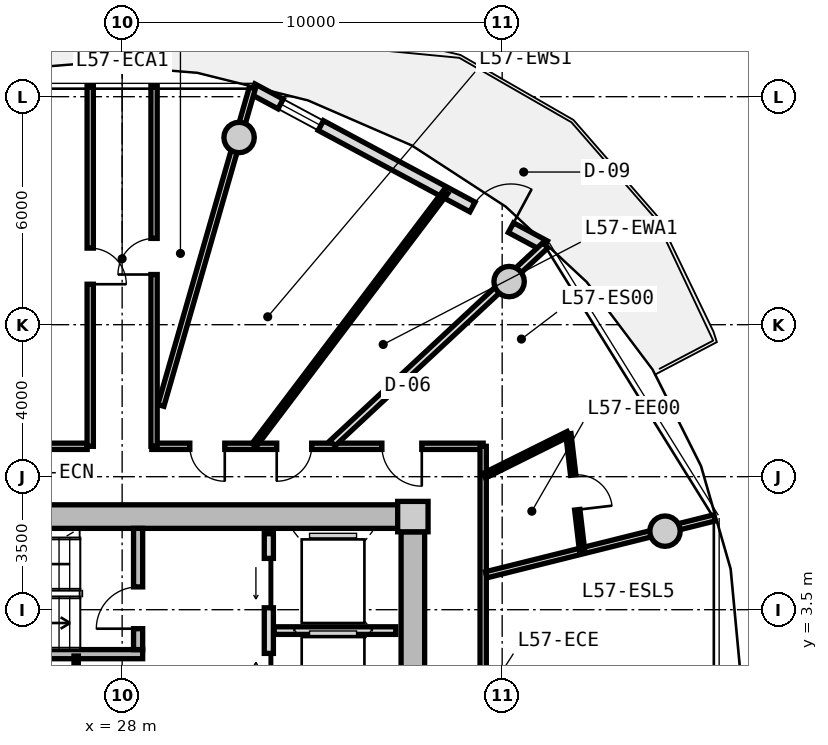
"""IFC4 building model, lengths in metres.
Left out: names, types, materials, properties, quantities, classifications, styles, units other than length and angle.
Written with IfcOpenShell. Run it as: python <this file> out.ifc"""

import sys

from ifc_helpers import new_model, si_unit, direction, frame, frame_2d, origin, origin_2d, place, context, subcontext, project, spatial, rectangle, circle, extrude, source, transform, mapped, element, fill, save


model = new_model("IFC4")
c1 = context("Model", 3, precision=1e-05, world=origin(), true_north=direction((0.0, 1.0)))
c2 = subcontext(c1, "Body", "Model", "MODEL_VIEW")
j1 = project(units=[si_unit("LENGTHUNIT", "METRE"), si_unit("PLANEANGLEUNIT", "RADIAN")], contexts=[c1])
p1 = place(None, origin())
s1 = spatial("IfcSite", under=j1, at=p1, CompositionType="ELEMENT")
p2 = place(p1, origin())
s2 = spatial("IfcBuilding", under=s1, at=p2, CompositionType="ELEMENT")
p3 = place(p2, frame((0.0, 0.0, 183.1)))
s3 = spatial("IfcBuildingStorey", under=s2, at=p3, CompositionType="ELEMENT", Elevation=183.1)
m1 = source(origin(), c2, "Body", "SweptSolid", [
    extrude(rectangle(XDim=0.8, YDim=0.8, at=origin_2d()), origin(), (0.0, 0.0, 1.0), 3.05),
])
p4 = place(p3, frame((35.65, 5.95, 0.0), z_axis=(0.0, 0.0, 1.0), x_axis=(1.0, 0.0, 0.0)))
e1 = element("IfcColumn", 1, at=p4, inside=s3, PredefinedType="COLUMN", context=c2, shape_type="MappedRepresentation", body=[
    mapped(m1, transform((0.0, 0.0, 0.0), x_axis=(1.0, 0.0, 0.0), y_axis=(0.0, 1.0, 0.0), z_axis=(0.0, 0.0, 1.0), scale=1.0)),
])
m2 = source(origin(), c2, "Body", "SweptSolid", [
    extrude(rectangle(XDim=14.5, YDim=0.62, at=frame_2d((7.25, 0.0))), origin(), (0.0, 0.0, 1.0), 2.73),
])
p5 = place(p3, frame((20.75, 5.95, 0.0), z_axis=(0.0, 0.0, 1.0), x_axis=(1.0, 0.0, 0.0)))
e2 = element("IfcWall", 2, at=p5, inside=s3, PredefinedType="SHEAR", context=c2, shape_type="MappedRepresentation", body=[
    mapped(m2, transform((0.0, 0.0, 0.0), x_axis=(1.0, 0.0, 0.0), y_axis=(0.0, 1.0, 0.0), z_axis=(0.0, 0.0, 1.0), scale=1.0)),
])
m3 = source(origin(), c2, "Body", "SweptSolid", [
    extrude(rectangle(XDim=11.1, YDim=0.62, at=frame_2d((5.55, 0.0))), origin(), (0.0, 0.0, 1.0), 2.73),
])
p6 = place(p3, frame((35.65, 5.55, 0.0), z_axis=(0.0, 0.0, 1.0), x_axis=(0.0, -1.0, 0.0)))
e3 = element("IfcWall", 3, at=p6, inside=s3, PredefinedType="SHEAR", context=c2, shape_type="MappedRepresentation", body=[
    mapped(m3, transform((0.0, 0.0, 0.0), x_axis=(1.0, 0.0, 0.0), y_axis=(0.0, 1.0, 0.0), z_axis=(0.0, 0.0, 1.0), scale=1.0)),
])
p7 = place(p6, frame((5.65, 0.0, 0.0)))
e4 = element("IfcOpeningElement", 4, at=p7, cuts=e3, PredefinedType="OPENING", context=c2, shape_type="SweptSolid", body=[
    extrude(rectangle(XDim=1.2, YDim=2.15, at=frame_2d((0.6, 1.075))), frame((0.0, 0.32, 0.0), z_axis=(0.0, -1.0, 0.0), x_axis=(1.0, 0.0, 0.0)), (0.0, 0.0, 1.0), 0.64),
])
m4 = source(origin(), c2, "Body", "SweptSolid", [
    extrude(circle(Radius=0.4, at=origin_2d()), origin(), (0.0, 0.0, 1.0), 3.05),
])
for number, where, z_axis, x_axis in (
    (5, (42.285, 5.567, 0.0), (0.0, 0.0, 1.0), (1.0, 0.0, 0.0)),
    (6, (38.183, 12.135, 0.0), (0.0, 0.0, 1.0), (1.0, 0.0, 0.0)),
    (7, (31.077, 15.926, 0.0), (0.0, 0.0, 1.0), (1.0, 0.0, 0.0)),
):
    element("IfcColumn", number, at=place(p3, frame(where, z_axis=z_axis, x_axis=x_axis)), inside=s3, PredefinedType="COLUMN", context=c2, shape_type="MappedRepresentation", body=[
        mapped(m4, transform((0.0, 0.0, 0.0), x_axis=(1.0, 0.0, 0.0), y_axis=(0.0, 1.0, 0.0), z_axis=(0.0, 0.0, 1.0), scale=1.0)),
    ])
m5 = source(origin(), c2, "Body", "SweptSolid", [
    extrude(rectangle(XDim=8.742, YDim=0.29, at=frame_2d((4.371, 0.0))), origin(), (0.0, 0.0, 1.0), 2.73),
])
p8 = place(p3, frame((31.422, 17.211, 0.0), z_axis=(0.0, 0.0, 1.0), x_axis=(0.880992489116, -0.473130250693, 0.0)))
e8 = element("IfcWall", 8, at=p8, inside=s3, PredefinedType="SOLIDWALL", context=c2, shape_type="MappedRepresentation", body=[
    mapped(m5, transform((0.0, 0.0, 0.0), x_axis=(1.0, 0.0, 0.0), y_axis=(0.0, 1.0, 0.0), z_axis=(0.0, 0.0, 1.0), scale=1.0)),
])
p9 = place(p8, frame((6.58, 0.0, 0.0)))
e9 = element("IfcOpeningElement", 9, at=p9, cuts=e8, PredefinedType="OPENING", context=c2, shape_type="SweptSolid", body=[
    extrude(rectangle(XDim=1.15, YDim=2.25, at=frame_2d((0.575, 1.125))), frame((0.0, 0.155, 0.0), z_axis=(0.0, -1.0, 0.0), x_axis=(1.0, 0.0, 0.0)), (0.0, 0.0, 1.0), 0.31),
])
p10 = place(p8, frame((0.85, 0.0, 0.85)))
e10 = element("IfcOpeningElement", 10, at=p10, cuts=e8, PredefinedType="OPENING", context=c2, shape_type="SweptSolid", body=[
    extrude(rectangle(XDim=1.2, YDim=1.5, at=frame_2d((0.6, 0.75))), frame((0.0, 0.155, 0.0), z_axis=(0.0, -1.0, 0.0), x_axis=(1.0, 0.0, 0.0)), (0.0, 0.0, 1.0), 0.31),
])
m6 = source(origin(), c2, "Body", "SweptSolid", [
    extrude(rectangle(XDim=7.88, YDim=0.24, at=frame_2d((3.94, 0.0))), origin(), (0.0, 0.0, 1.0), 2.73),
])
p11 = place(p3, frame((20.66, 2.33, 0.0), z_axis=(0.0, 0.0, 1.0), x_axis=(1.0, 0.0, 0.0)))
e11 = element("IfcWall", 11, at=p11, inside=s3, PredefinedType="PARTITIONING", context=c2, shape_type="MappedRepresentation", body=[
    mapped(m6, transform((0.0, 0.0, 0.0), x_axis=(1.0, 0.0, 0.0), y_axis=(0.0, 1.0, 0.0), z_axis=(0.0, 0.0, 1.0), scale=1.0)),
])
m7 = source(origin(), c2, "Body", "SweptSolid", [
    extrude(rectangle(XDim=3.19, YDim=0.24, at=frame_2d((1.595, 0.0))), origin(), (0.0, 0.0, 1.0), 2.73),
])
p12 = place(p3, frame((28.42, 2.45, 0.0), z_axis=(0.0, 0.0, 1.0), x_axis=(0.0, 1.0, 0.0)))
e12 = element("IfcWall", 12, at=p12, inside=s3, PredefinedType="PARTITIONING", context=c2, shape_type="MappedRepresentation", body=[
    mapped(m7, transform((0.0, 0.0, 0.0), x_axis=(1.0, 0.0, 0.0), y_axis=(0.0, 1.0, 0.0), z_axis=(0.0, 0.0, 1.0), scale=1.0)),
])
p13 = place(p12, frame((0.55, 0.0, 0.0)))
e13 = element("IfcOpeningElement", 13, at=p13, cuts=e12, PredefinedType="OPENING", context=c2, shape_type="SweptSolid", body=[
    extrude(rectangle(XDim=1.1, YDim=2.15, at=frame_2d((0.55, 1.075))), frame((0.0, 0.13, 0.0), z_axis=(0.0, -1.0, 0.0), x_axis=(1.0, 0.0, 0.0)), (0.0, 0.0, 1.0), 0.26),
])
m8 = source(origin(), c2, "Body", "SweptSolid", [
    extrude(rectangle(XDim=5.0, YDim=0.24, at=frame_2d((2.5, 0.0))), origin(), (0.0, 0.0, 1.0), 2.715),
])
p14 = place(p3, frame((31.86, 0.5, 0.0), z_axis=(0.0, 0.0, 1.0), x_axis=(0.0, 1.0, 0.0)))
e14 = element("IfcWall", 14, at=p14, inside=s3, PredefinedType="PARTITIONING", context=c2, shape_type="MappedRepresentation", body=[
    mapped(m8, transform((0.0, 0.0, 0.0), x_axis=(1.0, 0.0, 0.0), y_axis=(0.0, 1.0, 0.0), z_axis=(0.0, 0.0, 1.0), scale=1.0)),
])
p15 = place(p14, frame((3.05, 0.0, 0.0)))
e15 = element("IfcOpeningElement", 15, at=p15, cuts=e14, PredefinedType="OPENING", context=c2, shape_type="SweptSolid", body=[
    extrude(rectangle(XDim=1.3, YDim=2.2, at=frame_2d((0.65, 1.1))), frame((0.0, 0.13, 0.0), z_axis=(0.0, -1.0, 0.0), x_axis=(1.0, 0.0, 0.0)), (0.0, 0.0, 1.0), 0.26),
])
p16 = place(p14, frame((0.55, 0.0, 0.0)))
e16 = element("IfcOpeningElement", 16, at=p16, cuts=e14, PredefinedType="OPENING", context=c2, shape_type="SweptSolid", body=[
    extrude(rectangle(XDim=1.3, YDim=2.2, at=frame_2d((0.65, 1.1))), frame((0.0, 0.13, 0.0), z_axis=(0.0, -1.0, 0.0), x_axis=(1.0, 0.0, 0.0)), (0.0, 0.0, 1.0), 0.26),
])
m9 = source(origin(), c2, "Body", "SweptSolid", [
    extrude(rectangle(XDim=3.2, YDim=0.2, at=frame_2d((1.6, 0.0))), origin(), (0.0, 0.0, 1.0), 2.715),
])
p17 = place(p3, frame((32.0, 2.95, 0.0), z_axis=(0.0, 0.0, 1.0), x_axis=(1.0, 0.0, 0.0)))
e17 = element("IfcWall", 17, at=p17, inside=s3, PredefinedType="PARTITIONING", context=c2, shape_type="MappedRepresentation", body=[
    mapped(m9, transform((0.0, 0.0, 0.0), x_axis=(1.0, 0.0, 0.0), y_axis=(0.0, 1.0, 0.0), z_axis=(0.0, 0.0, 1.0), scale=1.0)),
])
m10 = source(origin(), c2, "Body", "SweptSolid", [
    extrude(rectangle(XDim=2.33, YDim=0.115, at=frame_2d((1.165, 0.0))), origin(), (0.0, 0.0, 1.0), 2.715),
])
p18 = place(p3, frame((26.79, -0.05, 0.0), z_axis=(0.0, 0.0, 1.0), x_axis=(0.0, 1.0, 0.0)))
e18 = element("IfcWall", 18, at=p18, inside=s3, PredefinedType="PARTITIONING", context=c2, shape_type="MappedRepresentation", body=[
    mapped(m10, transform((0.0, 0.0, 0.0), x_axis=(1.0, 0.0, 0.0), y_axis=(0.0, 1.0, 0.0), z_axis=(0.0, 0.0, 1.0), scale=1.0)),
])
m11 = source(origin(), c2, "Body", "SweptSolid", [
    extrude(rectangle(XDim=8.58, YDim=0.165, at=frame_2d((4.29, 0.0))), origin(), (0.0, 0.0, 1.0), 2.715),
])
p19 = place(p3, frame((18.5, 7.8, 0.0), z_axis=(0.0, 0.0, 1.0), x_axis=(1.0, 0.0, 0.0)))
e19 = element("IfcWall", 19, at=p19, inside=s3, PredefinedType="PARTITIONING", context=c2, shape_type="MappedRepresentation", body=[
    mapped(m11, transform((0.0, 0.0, 0.0), x_axis=(1.0, 0.0, 0.0), y_axis=(0.0, 1.0, 0.0), z_axis=(0.0, 0.0, 1.0), scale=1.0)),
])
p20 = place(p19, frame((2.843, 0.0, 0.0)))
e20 = element("IfcOpeningElement", 20, at=p20, cuts=e19, PredefinedType="OPENING", context=c2, shape_type="SweptSolid", body=[
    extrude(rectangle(XDim=1.25, YDim=2.2, at=frame_2d((0.625, 1.1))), frame((0.0, 0.093, 0.0), z_axis=(0.0, -1.0, 0.0), x_axis=(1.0, 0.0, 0.0)), (0.0, 0.0, 1.0), 0.185),
])
m12 = source(origin(), c2, "Body", "SweptSolid", [
    extrude(rectangle(XDim=8.719, YDim=0.165, at=frame_2d((4.36, 0.0))), origin(), (0.0, 0.0, 1.0), 2.715),
])
p21 = place(p3, frame((28.781, 7.8, 0.0), z_axis=(0.0, 0.0, 1.0), x_axis=(1.0, 0.0, 0.0)))
e21 = element("IfcWall", 21, at=p21, inside=s3, PredefinedType="PARTITIONING", context=c2, shape_type="MappedRepresentation", body=[
    mapped(m12, transform((0.0, 0.0, 0.0), x_axis=(1.0, 0.0, 0.0), y_axis=(0.0, 1.0, 0.0), z_axis=(0.0, 0.0, 1.0), scale=1.0)),
])
p22 = place(p21, frame((6.054, 0.0, 0.0)))
e22 = element("IfcOpeningElement", 22, at=p22, cuts=e21, PredefinedType="OPENING", context=c2, shape_type="SweptSolid", body=[
    extrude(rectangle(XDim=1.05, YDim=2.15, at=frame_2d((0.525, 1.075))), frame((0.0, 0.093, 0.0), z_axis=(0.0, -1.0, 0.0), x_axis=(1.0, 0.0, 0.0)), (0.0, 0.0, 1.0), 0.185),
])
p23 = place(p21, frame((3.287, 0.0, 0.0)))
e23 = element("IfcOpeningElement", 23, at=p23, cuts=e21, PredefinedType="OPENING", context=c2, shape_type="SweptSolid", body=[
    extrude(rectangle(XDim=0.92, YDim=2.1, at=frame_2d((0.46, 1.05))), frame((0.0, 0.093, 0.0), z_axis=(0.0, -1.0, 0.0), x_axis=(1.0, 0.0, 0.0)), (0.0, 0.0, 1.0), 0.185),
])
p24 = place(p21, frame((1.0, 0.0, 0.0)))
e24 = element("IfcOpeningElement", 24, at=p24, cuts=e21, PredefinedType="OPENING", context=c2, shape_type="SweptSolid", body=[
    extrude(rectangle(XDim=0.92, YDim=2.1, at=frame_2d((0.46, 1.05))), frame((0.0, 0.093, 0.0), z_axis=(0.0, -1.0, 0.0), x_axis=(1.0, 0.0, 0.0)), (0.0, 0.0, 1.0), 0.185),
])
m13 = source(origin(), c2, "Body", "SweptSolid", [
    extrude(rectangle(XDim=6.88, YDim=0.165, at=frame_2d((3.44, 0.0))), origin(), (0.0, 0.0, 1.0), 2.715),
])
p25 = place(p3, frame((37.5, 7.8, 0.0), z_axis=(0.0, 0.0, 1.0), x_axis=(0.0, -1.0, 0.0)))
e25 = element("IfcWall", 25, at=p25, inside=s3, PredefinedType="PARTITIONING", context=c2, shape_type="MappedRepresentation", body=[
    mapped(m13, transform((0.0, 0.0, 0.0), x_axis=(1.0, 0.0, 0.0), y_axis=(0.0, 1.0, 0.0), z_axis=(0.0, 0.0, 1.0), scale=1.0)),
])
m14 = source(origin(), c2, "Body", "SweptSolid", [
    extrude(rectangle(XDim=8.695, YDim=0.165, at=frame_2d((4.348, 0.0))), origin(), (0.0, 0.0, 1.0), 2.265),
])
p26 = place(p3, frame((29.02, 8.875, 0.0), z_axis=(0.0, 0.0, 1.0), x_axis=(0.276797231892, 0.960928349263, 0.0)))
e26 = element("IfcWall", 26, at=p26, inside=s3, PredefinedType="PARTITIONING", context=c2, shape_type="MappedRepresentation", body=[
    mapped(m14, transform((0.0, 0.0, 0.0), x_axis=(1.0, 0.0, 0.0), y_axis=(0.0, 1.0, 0.0), z_axis=(0.0, 0.0, 1.0), scale=1.0)),
])
m15 = source(origin(), c2, "Body", "SweptSolid", [
    extrude(rectangle(XDim=6.193, YDim=0.165, at=frame_2d((3.096, 0.0))), origin(), (0.0, 0.0, 1.0), 2.265),
])
p27 = place(p3, frame((37.58, 4.419, 0.0), z_axis=(0.0, 0.0, 1.0), x_axis=(0.970309243466, 0.241867674657, 0.0)))
e27 = element("IfcWall", 27, at=p27, inside=s3, PredefinedType="PARTITIONING", context=c2, shape_type="MappedRepresentation", body=[
    mapped(m15, transform((0.0, 0.0, 0.0), x_axis=(1.0, 0.0, 0.0), y_axis=(0.0, 1.0, 0.0), z_axis=(0.0, 0.0, 1.0), scale=1.0)),
])
m16 = source(origin(), c2, "Body", "SweptSolid", [
    extrude(rectangle(XDim=9.48, YDim=0.165, at=frame_2d((4.74, 0.0))), origin(), (0.0, 0.0, 1.0), 2.715),
])
p28 = place(p3, frame((27.16, 7.8, 0.0), z_axis=(0.0, 0.0, 1.0), x_axis=(0.0, 1.0, 0.0)))
e28 = element("IfcWall", 28, at=p28, inside=s3, PredefinedType="PARTITIONING", context=c2, shape_type="MappedRepresentation", body=[
    mapped(m16, transform((0.0, 0.0, 0.0), x_axis=(1.0, 0.0, 0.0), y_axis=(0.0, 1.0, 0.0), z_axis=(0.0, 0.0, 1.0), scale=1.0)),
])
p29 = place(p28, frame((4.265, 0.0, 0.0)))
e29 = element("IfcOpeningElement", 29, at=p29, cuts=e28, PredefinedType="OPENING", context=c2, shape_type="SweptSolid", body=[
    extrude(rectangle(XDim=0.95, YDim=2.1, at=frame_2d((0.475, 1.05))), frame((0.0, 0.093, 0.0), z_axis=(0.0, -1.0, 0.0), x_axis=(1.0, 0.0, 0.0)), (0.0, 0.0, 1.0), 0.185),
])
p30 = place(p3, frame((28.84, 17.28, 0.0), z_axis=(0.0, 0.0, 1.0), x_axis=(0.0, -1.0, 0.0)))
e30 = element("IfcWall", 30, at=p30, inside=s3, PredefinedType="PARTITIONING", context=c2, shape_type="MappedRepresentation", body=[
    mapped(m16, transform((0.0, 0.0, 0.0), x_axis=(1.0, 0.0, 0.0), y_axis=(0.0, 1.0, 0.0), z_axis=(0.0, 0.0, 1.0), scale=1.0)),
])
p31 = place(p30, frame((4.01, 0.0, 0.0)))
e31 = element("IfcOpeningElement", 31, at=p31, cuts=e30, PredefinedType="OPENING", context=c2, shape_type="SweptSolid", body=[
    extrude(rectangle(XDim=0.95, YDim=2.1, at=frame_2d((0.475, 1.05))), frame((0.0, 0.093, 0.0), z_axis=(0.0, -1.0, 0.0), x_axis=(1.0, 0.0, 0.0)), (0.0, 0.0, 1.0), 0.185),
])
m17 = source(origin(), c2, "Body", "SweptSolid", [
    extrude(rectangle(XDim=7.648, YDim=0.19, at=frame_2d((3.824, 0.0))), origin(), (0.0, 0.0, 1.0), 2.265),
])
p32 = place(p3, frame((33.538, 7.88, 0.0), z_axis=(0.0, 0.0, 1.0), x_axis=(0.732167856666, 0.681124239522, 0.0)))
e32 = element("IfcWall", 32, at=p32, inside=s3, PredefinedType="PARTITIONING", context=c2, shape_type="MappedRepresentation", body=[
    mapped(m17, transform((0.0, 0.0, 0.0), x_axis=(1.0, 0.0, 0.0), y_axis=(0.0, 1.0, 0.0), z_axis=(0.0, 0.0, 1.0), scale=1.0)),
])
m18 = source(origin(), c2, "Body", "SweptSolid", [
    extrude(rectangle(XDim=2.471, YDim=0.14, at=frame_2d((1.235, 0.0))), origin(), (0.0, 0.0, 1.0), 2.715),
])
p33 = place(p3, frame((37.53, 7.026, 0.0), z_axis=(0.0, 0.0, 1.0), x_axis=(0.895295102372, 0.445473545419, 0.0)))
e33 = element("IfcWall", 33, at=p33, inside=s3, PredefinedType="PARTITIONING", context=c2, shape_type="MappedRepresentation", body=[
    mapped(m18, transform((0.0, 0.0, 0.0), x_axis=(1.0, 0.0, 0.0), y_axis=(0.0, 1.0, 0.0), z_axis=(0.0, 0.0, 1.0), scale=1.0)),
])
m19 = source(origin(), c2, "Body", "SweptSolid", [
    extrude(rectangle(XDim=3.101, YDim=0.14, at=frame_2d((1.551, 0.0))), origin(), (0.0, 0.0, 1.0), 2.715),
])
p34 = place(p3, frame((39.742, 8.127, 0.0), z_axis=(0.0, 0.0, 1.0), x_axis=(0.116754457614, -0.993160811061, 0.0)))
e34 = element("IfcWall", 34, at=p34, inside=s3, PredefinedType="PARTITIONING", context=c2, shape_type="MappedRepresentation", body=[
    mapped(m19, transform((0.0, 0.0, 0.0), x_axis=(1.0, 0.0, 0.0), y_axis=(0.0, 1.0, 0.0), z_axis=(0.0, 0.0, 1.0), scale=1.0)),
])
p35 = place(p34, frame((1.09, 0.0, 0.0)))
e35 = element("IfcOpeningElement", 35, at=p35, cuts=e34, PredefinedType="OPENING", context=c2, shape_type="SweptSolid", body=[
    extrude(rectangle(XDim=0.92, YDim=2.1, at=frame_2d((0.46, 1.05))), frame((0.0, 0.08, 0.0), z_axis=(0.0, -1.0, 0.0), x_axis=(1.0, 0.0, 0.0)), (0.0, 0.0, 1.0), 0.16),
])
m20 = source(origin(), c2, "Body", "SweptSolid", [
    extrude(rectangle(XDim=8.359, YDim=0.14, at=frame_2d((4.18, 0.0))), origin(), (0.0, 0.0, 1.0), 2.715),
])
p36 = place(p3, frame((31.473, 7.83, 0.0), z_axis=(0.0, 0.0, 1.0), x_axis=(0.603265985309, 0.797540062297, 0.0)))
e36 = element("IfcWall", 36, at=p36, inside=s3, PredefinedType="PARTITIONING", context=c2, shape_type="MappedRepresentation", body=[
    mapped(m20, transform((0.0, 0.0, 0.0), x_axis=(1.0, 0.0, 0.0), y_axis=(0.0, 1.0, 0.0), z_axis=(0.0, 0.0, 1.0), scale=1.0)),
])
m21 = source(origin(), c2, "Body", "SweptSolid", [
    extrude(rectangle(XDim=1.15, YDim=2.25, at=frame_2d((0.575, 1.125))), frame((0.0, 0.025, 0.0), z_axis=(0.0, -1.0, 0.0), x_axis=(1.0, 0.0, 0.0)), (0.0, 0.0, 1.0), 0.05),
])
p37 = place(p9, origin())
e37 = element("IfcDoor", 37, at=p37, inside=s3, OperationType="SINGLE_SWING_RIGHT", PredefinedType="DOOR", context=c2, shape_type="MappedRepresentation", body=[
    mapped(m21, transform((0.0, 0.0, 0.0), x_axis=(1.0, 0.0, 0.0), y_axis=(0.0, 1.0, 0.0), z_axis=(0.0, 0.0, 1.0), scale=1.0)),
])
fill(e9, e37)
m22 = source(origin(), c2, "Body", "SweptSolid", [
    extrude(rectangle(XDim=1.2, YDim=1.5, at=frame_2d((0.6, 0.75))), frame((0.0, 0.03, 0.0), z_axis=(0.0, -1.0, 0.0), x_axis=(1.0, 0.0, 0.0)), (0.0, 0.0, 1.0), 0.06),
])
p38 = place(p10, origin())
e38 = element("IfcWindow", 38, at=p38, inside=s3, PartitioningType="SINGLE_PANEL", PredefinedType="WINDOW", context=c2, shape_type="MappedRepresentation", body=[
    mapped(m22, transform((0.0, 0.0, 0.0), x_axis=(1.0, 0.0, 0.0), y_axis=(0.0, 1.0, 0.0), z_axis=(0.0, 0.0, 1.0), scale=1.0)),
])
fill(e10, e38)
m23 = source(origin(), c2, "Body", "SweptSolid", [
    extrude(rectangle(XDim=1.1, YDim=2.15, at=frame_2d((0.55, 1.075))), frame((0.0, 0.025, 0.0), z_axis=(0.0, -1.0, 0.0), x_axis=(1.0, 0.0, 0.0)), (0.0, 0.0, 1.0), 0.05),
])
p39 = place(p13, origin())
e39 = element("IfcDoor", 39, at=p39, inside=s3, OperationType="SINGLE_SWING_LEFT", PredefinedType="DOOR", context=c2, shape_type="MappedRepresentation", body=[
    mapped(m23, transform((0.0, 0.0, 0.0), x_axis=(1.0, 0.0, 0.0), y_axis=(0.0, 1.0, 0.0), z_axis=(0.0, 0.0, 1.0), scale=1.0)),
])
fill(e13, e39)
m24 = source(origin(), c2, "Body", "SweptSolid", [
    extrude(rectangle(XDim=1.3, YDim=2.2, at=frame_2d((0.65, 1.1))), frame((0.0, 0.025, 0.0), z_axis=(0.0, -1.0, 0.0), x_axis=(1.0, 0.0, 0.0)), (0.0, 0.0, 1.0), 0.05),
])
p40 = place(p15, origin())
e40 = element("IfcDoor", 40, at=p40, inside=s3, OperationType="SLIDING_TO_LEFT", PredefinedType="DOOR", context=c2, shape_type="MappedRepresentation", body=[
    mapped(m24, transform((0.0, 0.0, 0.0), x_axis=(1.0, 0.0, 0.0), y_axis=(0.0, 1.0, 0.0), z_axis=(0.0, 0.0, 1.0), scale=1.0)),
])
fill(e15, e40)
p41 = place(p16, origin())
e41 = element("IfcDoor", 41, at=p41, inside=s3, OperationType="SLIDING_TO_RIGHT", PredefinedType="DOOR", context=c2, shape_type="MappedRepresentation", body=[
    mapped(m24, transform((0.0, 0.0, 0.0), x_axis=(1.0, 0.0, 0.0), y_axis=(0.0, 1.0, 0.0), z_axis=(0.0, 0.0, 1.0), scale=1.0)),
])
fill(e16, e41)
m25 = source(origin(), c2, "Body", "SweptSolid", [
    extrude(rectangle(XDim=0.95, YDim=2.1, at=frame_2d((0.475, 1.05))), frame((0.0, 0.025, 0.0), z_axis=(0.0, -1.0, 0.0), x_axis=(1.0, 0.0, 0.0)), (0.0, 0.0, 1.0), 0.05),
])
p42 = place(p29, frame((0.95, 0.0, 0.0), z_axis=(0.0, 0.0, 1.0), x_axis=(-1.0, 0.0, 0.0)))
e42 = element("IfcDoor", 42, at=p42, inside=s3, OperationType="SINGLE_SWING_RIGHT", PredefinedType="DOOR", context=c2, shape_type="MappedRepresentation", body=[
    mapped(m25, transform((0.0, 0.0, 0.0), x_axis=(1.0, 0.0, 0.0), y_axis=(0.0, 1.0, 0.0), z_axis=(0.0, 0.0, 1.0), scale=1.0)),
])
fill(e29, e42)
p43 = place(p31, frame((0.95, 0.0, 0.0), z_axis=(0.0, 0.0, 1.0), x_axis=(-1.0, 0.0, 0.0)))
e43 = element("IfcDoor", 43, at=p43, inside=s3, OperationType="SINGLE_SWING_LEFT", PredefinedType="DOOR", context=c2, shape_type="MappedRepresentation", body=[
    mapped(m25, transform((0.0, 0.0, 0.0), x_axis=(1.0, 0.0, 0.0), y_axis=(0.0, 1.0, 0.0), z_axis=(0.0, 0.0, 1.0), scale=1.0)),
])
fill(e31, e43)
m26 = source(origin(), c2, "Body", "SweptSolid", [
    extrude(rectangle(XDim=1.05, YDim=2.15, at=frame_2d((0.525, 1.075))), frame((0.0, 0.025, 0.0), z_axis=(0.0, -1.0, 0.0), x_axis=(1.0, 0.0, 0.0)), (0.0, 0.0, 1.0), 0.05),
])
p44 = place(p22, frame((1.05, 0.0, 0.0), z_axis=(0.0, 0.0, 1.0), x_axis=(-1.0, 0.0, 0.0)))
e44 = element("IfcDoor", 44, at=p44, inside=s3, OperationType="SINGLE_SWING_LEFT", PredefinedType="DOOR", context=c2, shape_type="MappedRepresentation", body=[
    mapped(m26, transform((0.0, 0.0, 0.0), x_axis=(1.0, 0.0, 0.0), y_axis=(0.0, 1.0, 0.0), z_axis=(0.0, 0.0, 1.0), scale=1.0)),
])
fill(e22, e44)
m27 = source(origin(), c2, "Body", "SweptSolid", [
    extrude(rectangle(XDim=0.92, YDim=2.1, at=frame_2d((0.46, 1.05))), frame((0.0, 0.025, 0.0), z_axis=(0.0, -1.0, 0.0), x_axis=(1.0, 0.0, 0.0)), (0.0, 0.0, 1.0), 0.05),
])
p45 = place(p35, origin())
e45 = element("IfcDoor", 45, at=p45, inside=s3, OperationType="SINGLE_SWING_RIGHT", PredefinedType="DOOR", context=c2, shape_type="MappedRepresentation", body=[
    mapped(m27, transform((0.0, 0.0, 0.0), x_axis=(1.0, 0.0, 0.0), y_axis=(0.0, 1.0, 0.0), z_axis=(0.0, 0.0, 1.0), scale=1.0)),
])
fill(e35, e45)
p46 = place(p23, frame((0.92, 0.0, 0.0), z_axis=(0.0, 0.0, 1.0), x_axis=(-1.0, 0.0, 0.0)))
e46 = element("IfcDoor", 46, at=p46, inside=s3, OperationType="SINGLE_SWING_RIGHT", PredefinedType="DOOR", context=c2, shape_type="MappedRepresentation", body=[
    mapped(m27, transform((0.0, 0.0, 0.0), x_axis=(1.0, 0.0, 0.0), y_axis=(0.0, 1.0, 0.0), z_axis=(0.0, 0.0, 1.0), scale=1.0)),
])
fill(e23, e46)
p47 = place(p24, frame((0.92, 0.0, 0.0), z_axis=(0.0, 0.0, 1.0), x_axis=(-1.0, 0.0, 0.0)))
e47 = element("IfcDoor", 47, at=p47, inside=s3, OperationType="SINGLE_SWING_LEFT", PredefinedType="DOOR", context=c2, shape_type="MappedRepresentation", body=[
    mapped(m27, transform((0.0, 0.0, 0.0), x_axis=(1.0, 0.0, 0.0), y_axis=(0.0, 1.0, 0.0), z_axis=(0.0, 0.0, 1.0), scale=1.0)),
])
fill(e24, e47)
save(model, sys.argv[1])
